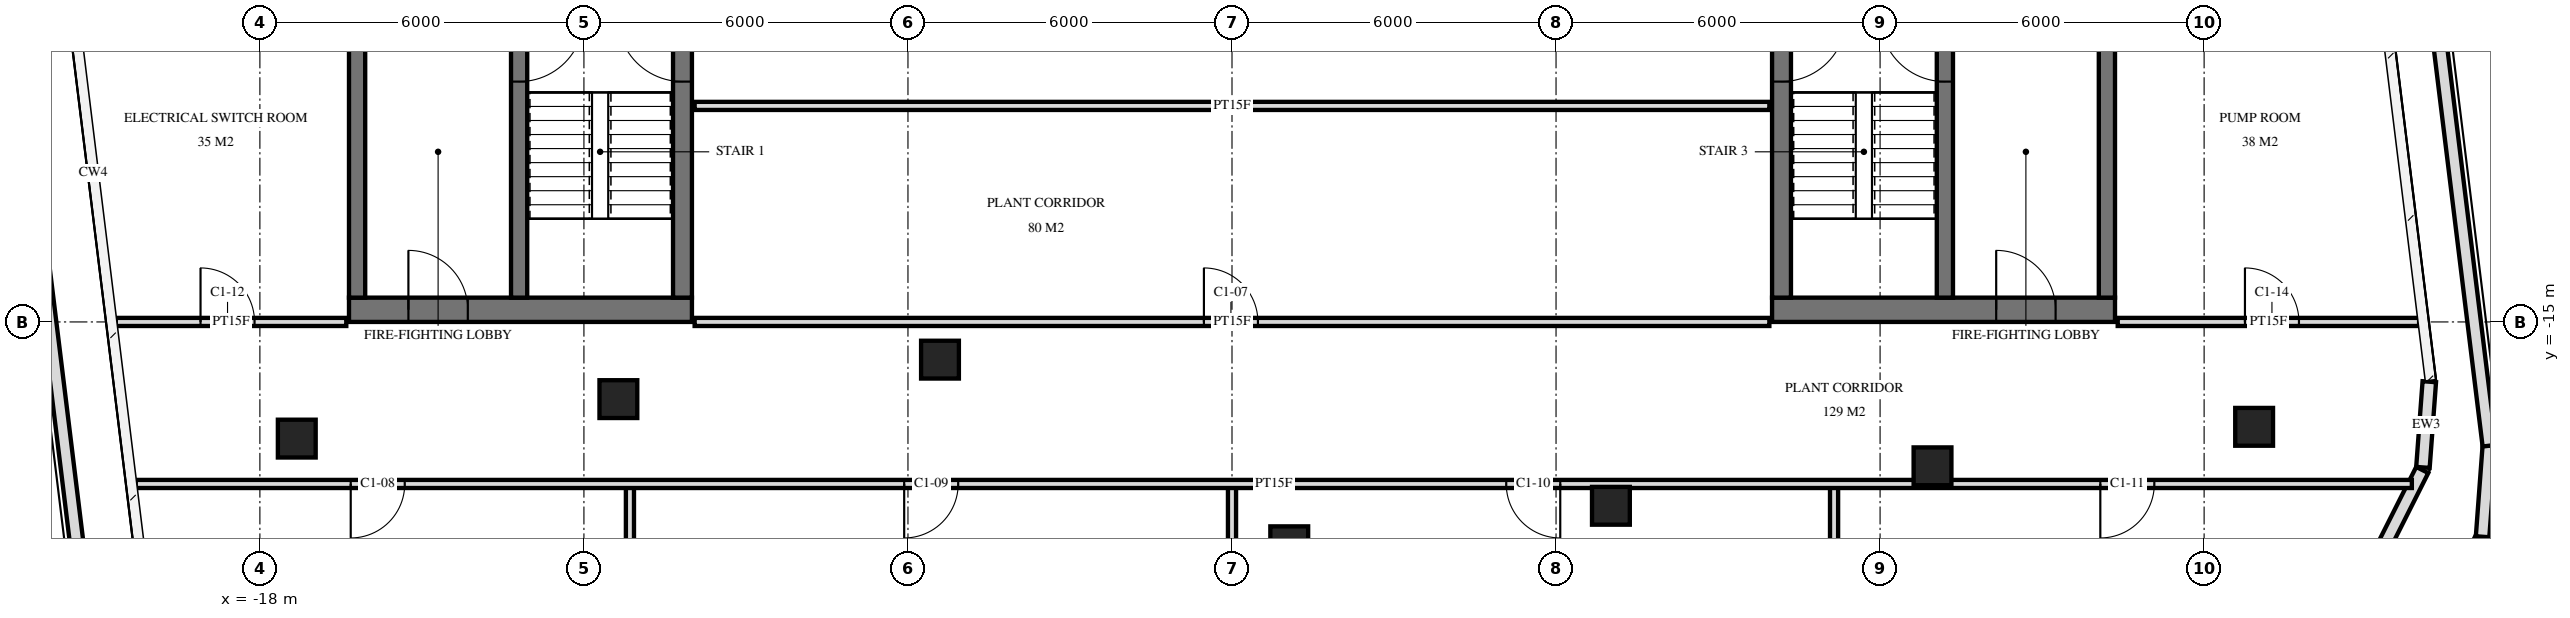
"""IFC4 building model, lengths in metres.
Left out: names, types, materials, properties, quantities, classifications, styles, units other than length and angle.
Written with IfcOpenShell. Run it as: python <this file> out.ifc"""

import sys

from ifc_helpers import new_model, si_unit, direction, frame, frame_2d, origin, origin_2d, place, context, subcontext, project, spatial, rectangle, extrude, element, fill, save


model = new_model("IFC4")
c1 = context("Model", 3, precision=1e-05, world=origin(), true_north=direction((0.0, 1.0)))
c2 = subcontext(c1, "Body", "Model", "MODEL_VIEW")
j1 = project(units=[si_unit("LENGTHUNIT", "METRE"), si_unit("PLANEANGLEUNIT", "RADIAN")], contexts=[c1])
p1 = place(None, origin())
s1 = spatial("IfcSite", under=j1, at=p1, CompositionType="ELEMENT")
p2 = place(p1, origin())
s2 = spatial("IfcBuilding", under=s1, at=p2, CompositionType="ELEMENT")
p3 = place(p2, frame((0.0, 0.0, 346.6)))
s3 = spatial("IfcBuildingStorey", under=s2, at=p3, CompositionType="ELEMENT", Elevation=346.6)
for number, where, z_axis, x_axis in (
    (1, (-17.317, -17.16, 0.0), (0.0, 0.0, 1.0), (1.0, 0.0, 0.0)),
    (2, (-11.362, -16.429, 0.0), (0.0, 0.0, 1.0), (1.0, 0.0, 0.0)),
    (3, (-5.407, -15.698, 0.0), (0.0, 0.0, 1.0), (1.0, 0.0, 0.0)),
    (4, (1.06, -19.135, 0.0), (0.0, 0.0, 1.0), (1.0, 0.0, 0.0)),
    (5, (7.016, -18.404, 0.0), (0.0, 0.0, 1.0), (1.0, 0.0, 0.0)),
    (6, (12.971, -17.673, 0.0), (0.0, 0.0, 1.0), (1.0, 0.0, 0.0)),
    (7, (18.926, -16.942, 0.0), (0.0, 0.0, 1.0), (1.0, 0.0, 0.0)),
):
    element("IfcColumn", number, at=place(p3, frame(where, z_axis=z_axis, x_axis=x_axis)), inside=s3, PredefinedType="COLUMN", context=c2, shape_type="SweptSolid", body=[
        extrude(rectangle(XDim=0.7, YDim=0.7, at=origin_2d()), origin(), (0.0, 0.0, 1.0), 3.6),
    ])
p4 = place(p3, frame((-16.35, -14.775, 0.0), z_axis=(0.0, 0.0, 1.0), x_axis=(1.0, 0.0, 0.0)))
e8 = element("IfcWall", 8, at=p4, inside=s3, PredefinedType="SHEAR", context=c2, shape_type="SweptSolid", body=[
    extrude(rectangle(XDim=6.35, YDim=0.45, at=frame_2d((3.175, 0.0))), origin(), (0.0, 0.0, 1.0), 3.6),
])
p5 = place(p4, frame((1.1, 0.0, 0.0)))
e9 = element("IfcOpeningElement", 9, at=p5, cuts=e8, PredefinedType="OPENING", context=c2, shape_type="SweptSolid", body=[
    extrude(rectangle(XDim=1.1, YDim=2.1, at=frame_2d((0.55, 1.05))), frame((0.0, 0.235, 0.0), z_axis=(0.0, -1.0, 0.0), x_axis=(1.0, 0.0, 0.0)), (0.0, 0.0, 1.0), 0.47),
])
p6 = place(p3, frame((-10.175, -14.55, 0.0), z_axis=(0.0, 0.0, 1.0), x_axis=(0.0, 1.0, 0.0)))
e10 = element("IfcWall", 10, at=p6, inside=s3, PredefinedType="SHEAR", context=c2, shape_type="SweptSolid", body=[
    extrude(rectangle(XDim=14.1, YDim=0.35, at=frame_2d((7.05, 0.0))), origin(), (0.0, 0.0, 1.0), 3.6),
])
p7 = place(p6, frame((4.0, 0.0, 0.0)))
e11 = element("IfcOpeningElement", 11, at=p7, cuts=e10, PredefinedType="OPENING", context=c2, shape_type="SweptSolid", body=[
    extrude(rectangle(XDim=1.2, YDim=2.1, at=frame_2d((0.6, 1.05))), frame((0.0, 0.185, 0.0), z_axis=(0.0, -1.0, 0.0), x_axis=(1.0, 0.0, 0.0)), (0.0, 0.0, 1.0), 0.37),
])
p8 = place(p3, frame((-16.2, -14.55, 0.0), z_axis=(0.0, 0.0, 1.0), x_axis=(0.0, 1.0, 0.0)))
e12 = element("IfcWall", 12, at=p8, inside=s3, PredefinedType="SHEAR", context=c2, shape_type="SweptSolid", body=[
    extrude(rectangle(XDim=5.4, YDim=0.3, at=frame_2d((2.7, 0.0))), origin(), (0.0, 0.0, 1.0), 3.6),
])
p9 = place(p3, frame((-13.2, -14.55, 0.0), z_axis=(0.0, 0.0, 1.0), x_axis=(0.0, 1.0, 0.0)))
e13 = element("IfcWall", 13, at=p9, inside=s3, PredefinedType="SHEAR", context=c2, shape_type="SweptSolid", body=[
    extrude(rectangle(XDim=5.4, YDim=0.3, at=frame_2d((2.7, 0.0))), origin(), (0.0, 0.0, 1.0), 3.6),
])
p10 = place(p9, frame((4.0, 0.0, 0.0)))
e14 = element("IfcOpeningElement", 14, at=p10, cuts=e13, PredefinedType="OPENING", context=c2, shape_type="SweptSolid", body=[
    extrude(rectangle(XDim=1.2, YDim=2.1, at=frame_2d((0.6, 1.05))), frame((0.0, 0.16, 0.0), z_axis=(0.0, -1.0, 0.0), x_axis=(1.0, 0.0, 0.0)), (0.0, 0.0, 1.0), 0.32),
])
p11 = place(p3, frame((10.0, -14.775, 0.0), z_axis=(0.0, 0.0, 1.0), x_axis=(1.0, 0.0, 0.0)))
e15 = element("IfcWall", 15, at=p11, inside=s3, PredefinedType="SHEAR", context=c2, shape_type="SweptSolid", body=[
    extrude(rectangle(XDim=6.35, YDim=0.45, at=frame_2d((3.175, 0.0))), origin(), (0.0, 0.0, 1.0), 3.6),
])
p12 = place(p11, frame((4.15, 0.0, 0.0)))
e16 = element("IfcOpeningElement", 16, at=p12, cuts=e15, PredefinedType="OPENING", context=c2, shape_type="SweptSolid", body=[
    extrude(rectangle(XDim=1.1, YDim=2.1, at=frame_2d((0.55, 1.05))), frame((0.0, 0.235, 0.0), z_axis=(0.0, -1.0, 0.0), x_axis=(1.0, 0.0, 0.0)), (0.0, 0.0, 1.0), 0.47),
])
p13 = place(p3, frame((10.175, -14.55, 0.0), z_axis=(0.0, 0.0, 1.0), x_axis=(0.0, 1.0, 0.0)))
e17 = element("IfcWall", 17, at=p13, inside=s3, PredefinedType="SHEAR", context=c2, shape_type="SweptSolid", body=[
    extrude(rectangle(XDim=14.1, YDim=0.35, at=frame_2d((7.05, 0.0))), origin(), (0.0, 0.0, 1.0), 3.6),
])
p14 = place(p13, frame((4.0, 0.0, 0.0)))
e18 = element("IfcOpeningElement", 18, at=p14, cuts=e17, PredefinedType="OPENING", context=c2, shape_type="SweptSolid", body=[
    extrude(rectangle(XDim=1.2, YDim=2.1, at=frame_2d((0.6, 1.05))), frame((0.0, 0.185, 0.0), z_axis=(0.0, -1.0, 0.0), x_axis=(1.0, 0.0, 0.0)), (0.0, 0.0, 1.0), 0.37),
])
p15 = place(p3, frame((16.2, -14.55, 0.0), z_axis=(0.0, 0.0, 1.0), x_axis=(0.0, 1.0, 0.0)))
e19 = element("IfcWall", 19, at=p15, inside=s3, PredefinedType="SHEAR", context=c2, shape_type="SweptSolid", body=[
    extrude(rectangle(XDim=5.4, YDim=0.3, at=frame_2d((2.7, 0.0))), origin(), (0.0, 0.0, 1.0), 3.6),
])
p16 = place(p3, frame((13.2, -14.55, 0.0), z_axis=(0.0, 0.0, 1.0), x_axis=(0.0, 1.0, 0.0)))
e20 = element("IfcWall", 20, at=p16, inside=s3, PredefinedType="SHEAR", context=c2, shape_type="SweptSolid", body=[
    extrude(rectangle(XDim=5.4, YDim=0.3, at=frame_2d((2.7, 0.0))), origin(), (0.0, 0.0, 1.0), 3.6),
])
p17 = place(p16, frame((4.0, 0.0, 0.0)))
e21 = element("IfcOpeningElement", 21, at=p17, cuts=e20, PredefinedType="OPENING", context=c2, shape_type="SweptSolid", body=[
    extrude(rectangle(XDim=1.2, YDim=2.1, at=frame_2d((0.6, 1.05))), frame((0.0, 0.16, 0.0), z_axis=(0.0, -1.0, 0.0), x_axis=(1.0, 0.0, 0.0)), (0.0, 0.0, 1.0), 0.32),
])
p18 = place(p3, frame((21.334, -19.139, 0.0), z_axis=(0.0, 0.0, 1.0), x_axis=(0.450141479344, 0.892957249018, 0.0)))
e22 = element("IfcWall", 22, at=p18, inside=s3, PredefinedType="SOLIDWALL", context=c2, shape_type="SweptSolid", body=[
    extrude(rectangle(XDim=1.566, YDim=0.25, at=frame_2d((0.783, 0.0))), origin(), (0.0, 0.0, 1.0), 3.32),
])
p19 = place(p3, frame((22.052, -17.694, 0.0), z_axis=(0.0, 0.0, 1.0), x_axis=(0.074103388081, 0.997250564239, 0.0)))
e23 = element("IfcWall", 23, at=p19, inside=s3, PredefinedType="SOLIDWALL", context=c2, shape_type="SweptSolid", body=[
    extrude(rectangle(XDim=1.591, YDim=0.25, at=frame_2d((0.796, 0.0))), origin(), (0.0, 0.0, 1.0), 3.32),
])
p20 = place(p3, frame((20.947, 1.722, 0.0), z_axis=(0.0, 0.0, 1.0), x_axis=(0.12187456146, -0.992545510931, 0.0)))
e24 = element("IfcWall", 24, at=p20, inside=s3, PredefinedType="PARAPET", context=c2, shape_type="SweptSolid", body=[
    extrude(rectangle(XDim=19.157, YDim=0.25, at=frame_2d((9.578, 0.0))), origin(), (0.0, 0.0, 1.0), 1.1),
])
p21 = place(p3, frame((23.281, -17.292, 0.0), z_axis=(0.0, 0.0, 1.0), x_axis=(-0.074089798327, -0.997251573969, 0.0)))
e25 = element("IfcWall", 25, at=p21, inside=s3, PredefinedType="PARAPET", context=c2, shape_type="SweptSolid", body=[
    extrude(rectangle(XDim=1.69, YDim=0.25, at=frame_2d((0.845, 0.0))), origin(), (0.0, 0.0, 1.0), 1.1),
])
p22 = place(p3, frame((23.156, -18.978, 0.0), z_axis=(0.0, 0.0, 1.0), x_axis=(-0.450137976098, -0.892959015003, 0.0)))
e26 = element("IfcWall", 26, at=p22, inside=s3, PredefinedType="PARAPET", context=c2, shape_type="SweptSolid", body=[
    extrude(rectangle(XDim=1.668, YDim=0.25, at=frame_2d((0.834, 0.0))), origin(), (0.0, 0.0, 1.0), 1.1),
])
p23 = place(p3, frame((-20.947, -22.722, 0.0), z_axis=(0.0, 0.0, 1.0), x_axis=(-0.12187456146, 0.992545510931, 0.0)))
e27 = element("IfcWall", 27, at=p23, inside=s3, PredefinedType="PARAPET", context=c2, shape_type="SweptSolid", body=[
    extrude(rectangle(XDim=19.157, YDim=0.25, at=frame_2d((9.578, 0.0))), origin(), (0.0, 0.0, 1.0), 1.1),
])
p24 = place(p3, frame((11.148, -21.58, 0.0), z_axis=(0.0, 0.0, 1.0), x_axis=(0.0, 1.0, 0.0)))
e28 = element("IfcWall", 28, at=p24, inside=s3, PredefinedType="PARTITIONING", context=c2, shape_type="SweptSolid", body=[
    extrude(rectangle(XDim=3.58, YDim=0.15, at=frame_2d((1.79, 0.0))), origin(), (0.0, 0.0, 1.0), 3.32),
])
p25 = place(p3, frame((0.0, -22.949, 0.0), z_axis=(0.0, 0.0, 1.0), x_axis=(0.0, 1.0, 0.0)))
e29 = element("IfcWall", 29, at=p25, inside=s3, PredefinedType="PARTITIONING", context=c2, shape_type="SweptSolid", body=[
    extrude(rectangle(XDim=4.949, YDim=0.15, at=frame_2d((2.474, 0.0))), origin(), (0.0, 0.0, 1.0), 3.32),
])
p26 = place(p3, frame((-11.148, -24.317, 0.0), z_axis=(0.0, 0.0, 1.0), x_axis=(0.0, 1.0, 0.0)))
e30 = element("IfcWall", 30, at=p26, inside=s3, PredefinedType="PARTITIONING", context=c2, shape_type="SweptSolid", body=[
    extrude(rectangle(XDim=6.317, YDim=0.15, at=frame_2d((3.159, 0.0))), origin(), (0.0, 0.0, 1.0), 3.32),
])
p27 = place(p3, frame((-20.299, -18.0, 0.0), z_axis=(0.0, 0.0, 1.0), x_axis=(1.0, 0.0, 0.0)))
e31 = element("IfcWall", 31, at=p27, inside=s3, PredefinedType="PARTITIONING", context=c2, shape_type="SweptSolid", body=[
    extrude(rectangle(XDim=42.146, YDim=0.15, at=frame_2d((21.073, 0.0))), origin(), (0.0, 0.0, 1.0), 3.32),
])
p28 = place(p27, frame((3.981, 0.0, 0.0)))
e32 = element("IfcOpeningElement", 32, at=p28, cuts=e31, PredefinedType="OPENING", context=c2, shape_type="SweptSolid", body=[
    extrude(rectangle(XDim=1.0, YDim=2.1, at=frame_2d((0.5, 1.05))), frame((0.0, 0.085, 0.0), z_axis=(0.0, -1.0, 0.0), x_axis=(1.0, 0.0, 0.0)), (0.0, 0.0, 1.0), 0.17),
])
p29 = place(p27, frame((14.229, 0.0, 0.0)))
e33 = element("IfcOpeningElement", 33, at=p29, cuts=e31, PredefinedType="OPENING", context=c2, shape_type="SweptSolid", body=[
    extrude(rectangle(XDim=1.0, YDim=2.1, at=frame_2d((0.5, 1.05))), frame((0.0, 0.085, 0.0), z_axis=(0.0, -1.0, 0.0), x_axis=(1.0, 0.0, 0.0)), (0.0, 0.0, 1.0), 0.17),
])
p30 = place(p27, frame((25.377, 0.0, 0.0)))
e34 = element("IfcOpeningElement", 34, at=p30, cuts=e31, PredefinedType="OPENING", context=c2, shape_type="SweptSolid", body=[
    extrude(rectangle(XDim=1.0, YDim=2.1, at=frame_2d((0.5, 1.05))), frame((0.0, 0.085, 0.0), z_axis=(0.0, -1.0, 0.0), x_axis=(1.0, 0.0, 0.0)), (0.0, 0.0, 1.0), 0.17),
])
p31 = place(p27, frame((36.377, 0.0, 0.0)))
e35 = element("IfcOpeningElement", 35, at=p31, cuts=e31, PredefinedType="OPENING", context=c2, shape_type="SweptSolid", body=[
    extrude(rectangle(XDim=1.0, YDim=2.1, at=frame_2d((0.5, 1.05))), frame((0.0, 0.085, 0.0), z_axis=(0.0, -1.0, 0.0), x_axis=(1.0, 0.0, 0.0)), (0.0, 0.0, 1.0), 0.17),
])
p32 = place(p3, frame((-20.668, -15.0, 0.0), z_axis=(0.0, 0.0, 1.0), x_axis=(1.0, 0.0, 0.0)))
e36 = element("IfcWall", 36, at=p32, inside=s3, PredefinedType="PARTITIONING", context=c2, shape_type="SweptSolid", body=[
    extrude(rectangle(XDim=4.268, YDim=0.15, at=frame_2d((2.134, 0.0))), origin(), (0.0, 0.0, 1.0), 3.32),
])
p33 = place(p32, frame((1.569, 0.0, 0.0)))
e37 = element("IfcOpeningElement", 37, at=p33, cuts=e36, PredefinedType="OPENING", context=c2, shape_type="SweptSolid", body=[
    extrude(rectangle(XDim=1.0, YDim=2.1, at=frame_2d((0.5, 1.05))), frame((0.0, 0.085, 0.0), z_axis=(0.0, -1.0, 0.0), x_axis=(1.0, 0.0, 0.0)), (0.0, 0.0, 1.0), 0.17),
])
p34 = place(p3, frame((-9.95, -15.0, 0.0), z_axis=(0.0, 0.0, 1.0), x_axis=(1.0, 0.0, 0.0)))
e38 = element("IfcWall", 38, at=p34, inside=s3, PredefinedType="PARTITIONING", context=c2, shape_type="SweptSolid", body=[
    extrude(rectangle(XDim=19.9, YDim=0.15, at=frame_2d((9.95, 0.0))), origin(), (0.0, 0.0, 1.0), 2.684),
])
p35 = place(p34, frame((9.43, 0.0, 0.0)))
e39 = element("IfcOpeningElement", 39, at=p35, cuts=e38, PredefinedType="OPENING", context=c2, shape_type="SweptSolid", body=[
    extrude(rectangle(XDim=1.0, YDim=2.1, at=frame_2d((0.5, 1.05))), frame((0.0, 0.085, 0.0), z_axis=(0.0, -1.0, 0.0), x_axis=(1.0, 0.0, 0.0)), (0.0, 0.0, 1.0), 0.17),
])
p36 = place(p3, frame((16.4, -15.0, 0.0), z_axis=(0.0, 0.0, 1.0), x_axis=(1.0, 0.0, 0.0)))
e40 = element("IfcWall", 40, at=p36, inside=s3, PredefinedType="PARTITIONING", context=c2, shape_type="SweptSolid", body=[
    extrude(rectangle(XDim=5.581, YDim=0.15, at=frame_2d((2.791, 0.0))), origin(), (0.0, 0.0, 1.0), 3.32),
])
p37 = place(p36, frame((2.356, 0.0, 0.0)))
e41 = element("IfcOpeningElement", 41, at=p37, cuts=e40, PredefinedType="OPENING", context=c2, shape_type="SweptSolid", body=[
    extrude(rectangle(XDim=1.0, YDim=2.1, at=frame_2d((0.5, 1.05))), frame((0.0, 0.085, 0.0), z_axis=(0.0, -1.0, 0.0), x_axis=(1.0, 0.0, 0.0)), (0.0, 0.0, 1.0), 0.17),
])
p38 = place(p3, frame((-9.95, -11.0, 0.0), z_axis=(0.0, 0.0, 1.0), x_axis=(1.0, 0.0, 0.0)))
e42 = element("IfcWall", 42, at=p38, inside=s3, PredefinedType="PARTITIONING", context=c2, shape_type="SweptSolid", body=[
    extrude(rectangle(XDim=19.9, YDim=0.15, at=frame_2d((9.95, 0.0))), origin(), (0.0, 0.0, 1.0), 3.32),
])
p39 = place(p7, origin())
e43 = element("IfcDoor", 43, at=p39, inside=s3, OperationType="SINGLE_SWING_LEFT", PredefinedType="DOOR", context=c2, shape_type="SweptSolid", body=[
    extrude(rectangle(XDim=1.2, YDim=2.1, at=frame_2d((0.6, 1.05))), frame((0.0, 0.025, 0.0), z_axis=(0.0, -1.0, 0.0), x_axis=(1.0, 0.0, 0.0)), (0.0, 0.0, 1.0), 0.05),
])
fill(e11, e43)
p40 = place(p5, origin())
e44 = element("IfcDoor", 44, at=p40, inside=s3, OperationType="SINGLE_SWING_RIGHT", PredefinedType="DOOR", context=c2, shape_type="SweptSolid", body=[
    extrude(rectangle(XDim=1.1, YDim=2.1, at=frame_2d((0.55, 1.05))), frame((0.0, 0.025, 0.0), z_axis=(0.0, -1.0, 0.0), x_axis=(1.0, 0.0, 0.0)), (0.0, 0.0, 1.0), 0.05),
])
fill(e9, e44)
p41 = place(p10, frame((0.6, 0.0, 0.0), z_axis=(0.0, 0.0, 1.0), x_axis=(-1.0, 0.0, 0.0)))
e45 = element("IfcDoor", 45, at=p41, inside=s3, OperationType="SINGLE_SWING_RIGHT", PredefinedType="DOOR", context=c2, shape_type="SweptSolid", body=[
    extrude(rectangle(XDim=1.2, YDim=2.1, at=frame_2d((0.0, 1.05))), frame((0.0, -0.025, 0.0), z_axis=(0.0, 1.0, 0.0), x_axis=(-1.0, 0.0, 0.0)), (0.0, 0.0, 1.0), 0.05),
])
fill(e14, e45)
p42 = place(p14, frame((0.6, 0.0, 0.0), z_axis=(0.0, 0.0, 1.0), x_axis=(-1.0, 0.0, 0.0)))
e46 = element("IfcDoor", 46, at=p42, inside=s3, OperationType="SINGLE_SWING_RIGHT", PredefinedType="DOOR", context=c2, shape_type="SweptSolid", body=[
    extrude(rectangle(XDim=1.2, YDim=2.1, at=frame_2d((0.0, 1.05))), frame((0.0, -0.025, 0.0), z_axis=(0.0, 1.0, 0.0), x_axis=(-1.0, 0.0, 0.0)), (0.0, 0.0, 1.0), 0.05),
])
fill(e18, e46)
p43 = place(p12, origin())
e47 = element("IfcDoor", 47, at=p43, inside=s3, OperationType="SINGLE_SWING_RIGHT", PredefinedType="DOOR", context=c2, shape_type="SweptSolid", body=[
    extrude(rectangle(XDim=1.1, YDim=2.1, at=frame_2d((0.55, 1.05))), frame((0.0, 0.025, 0.0), z_axis=(0.0, -1.0, 0.0), x_axis=(1.0, 0.0, 0.0)), (0.0, 0.0, 1.0), 0.05),
])
fill(e16, e47)
p44 = place(p17, origin())
e48 = element("IfcDoor", 48, at=p44, inside=s3, OperationType="SINGLE_SWING_LEFT", PredefinedType="DOOR", context=c2, shape_type="SweptSolid", body=[
    extrude(rectangle(XDim=1.2, YDim=2.1, at=frame_2d((0.6, 1.05))), frame((0.0, 0.025, 0.0), z_axis=(0.0, -1.0, 0.0), x_axis=(1.0, 0.0, 0.0)), (0.0, 0.0, 1.0), 0.05),
])
fill(e21, e48)
p45 = place(p35, origin())
e49 = element("IfcDoor", 49, at=p45, inside=s3, OperationType="SINGLE_SWING_RIGHT", PredefinedType="DOOR", context=c2, shape_type="SweptSolid", body=[
    extrude(rectangle(XDim=1.0, YDim=2.1, at=frame_2d((0.5, 1.05))), frame((0.0, 0.025, 0.0), z_axis=(0.0, -1.0, 0.0), x_axis=(1.0, 0.0, 0.0)), (0.0, 0.0, 1.0), 0.05),
])
fill(e39, e49)
p46 = place(p28, frame((0.5, 0.0, 0.0), z_axis=(0.0, 0.0, 1.0), x_axis=(-1.0, 0.0, 0.0)))
e50 = element("IfcDoor", 50, at=p46, inside=s3, OperationType="SINGLE_SWING_LEFT", PredefinedType="DOOR", context=c2, shape_type="SweptSolid", body=[
    extrude(rectangle(XDim=1.0, YDim=2.1, at=frame_2d((0.0, 1.05))), frame((0.0, -0.025, 0.0), z_axis=(0.0, 1.0, 0.0), x_axis=(-1.0, 0.0, 0.0)), (0.0, 0.0, 1.0), 0.05),
])
fill(e32, e50)
p47 = place(p29, frame((0.5, 0.0, 0.0), z_axis=(0.0, 0.0, 1.0), x_axis=(-1.0, 0.0, 0.0)))
e51 = element("IfcDoor", 51, at=p47, inside=s3, OperationType="SINGLE_SWING_LEFT", PredefinedType="DOOR", context=c2, shape_type="SweptSolid", body=[
    extrude(rectangle(XDim=1.0, YDim=2.1, at=frame_2d((0.0, 1.05))), frame((0.0, -0.025, 0.0), z_axis=(0.0, 1.0, 0.0), x_axis=(-1.0, 0.0, 0.0)), (0.0, 0.0, 1.0), 0.05),
])
fill(e33, e51)
p48 = place(p30, frame((0.5, 0.0, 0.0), z_axis=(0.0, 0.0, 1.0), x_axis=(-1.0, 0.0, 0.0)))
e52 = element("IfcDoor", 52, at=p48, inside=s3, OperationType="SINGLE_SWING_RIGHT", PredefinedType="DOOR", context=c2, shape_type="SweptSolid", body=[
    extrude(rectangle(XDim=1.0, YDim=2.1, at=frame_2d((0.0, 1.05))), frame((0.0, -0.025, 0.0), z_axis=(0.0, 1.0, 0.0), x_axis=(-1.0, 0.0, 0.0)), (0.0, 0.0, 1.0), 0.05),
])
fill(e34, e52)
p49 = place(p31, frame((0.5, 0.0, 0.0), z_axis=(0.0, 0.0, 1.0), x_axis=(-1.0, 0.0, 0.0)))
e53 = element("IfcDoor", 53, at=p49, inside=s3, OperationType="SINGLE_SWING_LEFT", PredefinedType="DOOR", context=c2, shape_type="SweptSolid", body=[
    extrude(rectangle(XDim=1.0, YDim=2.1, at=frame_2d((0.0, 1.05))), frame((0.0, -0.025, 0.0), z_axis=(0.0, 1.0, 0.0), x_axis=(-1.0, 0.0, 0.0)), (0.0, 0.0, 1.0), 0.05),
])
fill(e35, e53)
p50 = place(p33, origin())
e54 = element("IfcDoor", 54, at=p50, inside=s3, OperationType="SINGLE_SWING_RIGHT", PredefinedType="DOOR", context=c2, shape_type="SweptSolid", body=[
    extrude(rectangle(XDim=1.0, YDim=2.1, at=frame_2d((0.5, 1.05))), frame((0.0, 0.025, 0.0), z_axis=(0.0, -1.0, 0.0), x_axis=(1.0, 0.0, 0.0)), (0.0, 0.0, 1.0), 0.05),
])
fill(e37, e54)
p51 = place(p37, origin())
e55 = element("IfcDoor", 55, at=p51, inside=s3, OperationType="SINGLE_SWING_RIGHT", PredefinedType="DOOR", context=c2, shape_type="SweptSolid", body=[
    extrude(rectangle(XDim=1.0, YDim=2.1, at=frame_2d((0.5, 1.05))), frame((0.0, 0.025, 0.0), z_axis=(0.0, -1.0, 0.0), x_axis=(1.0, 0.0, 0.0)), (0.0, 0.0, 1.0), 0.05),
])
fill(e41, e55)
save(model, sys.argv[1])
